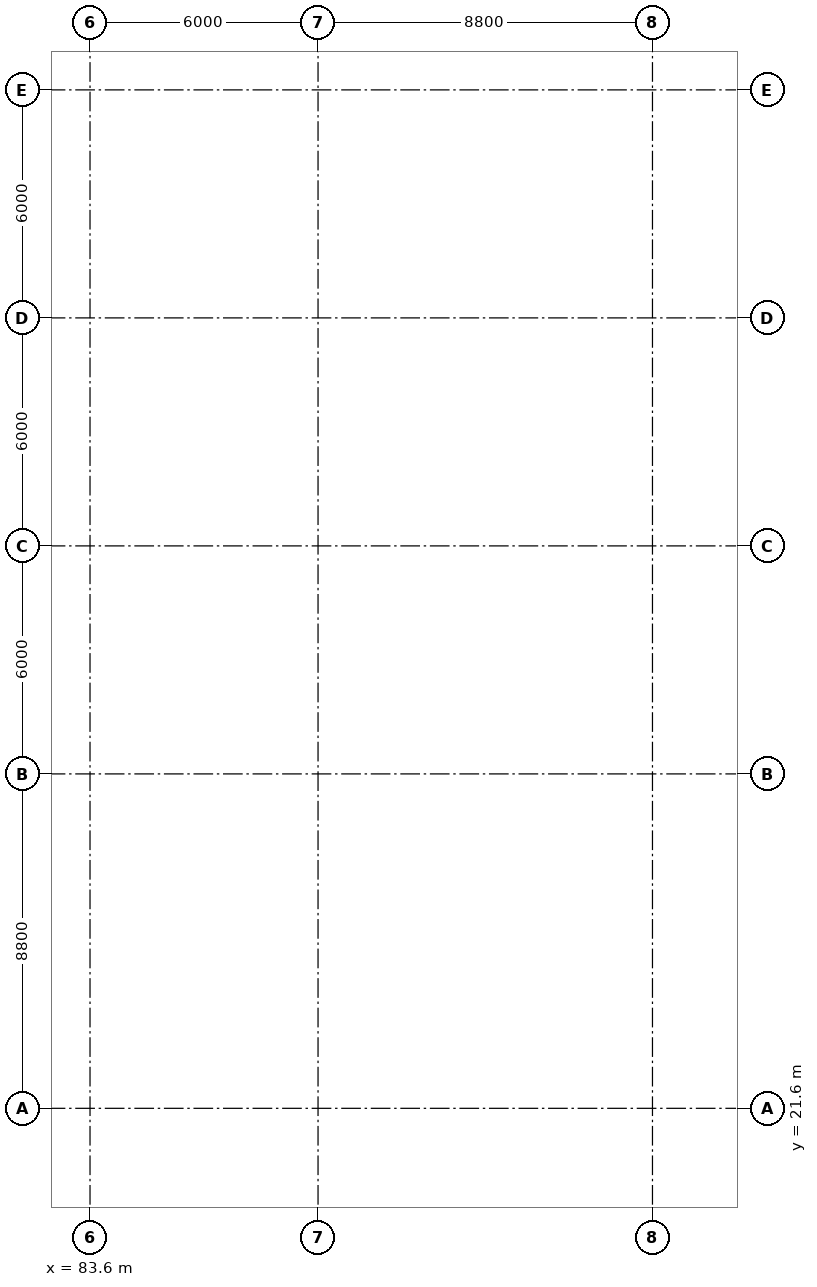
"""IFC4 building model, lengths in metres.
Left out: names, types, materials, properties, quantities, classifications, styles, units other than length and angle.
Written with IfcOpenShell. Run it as: python <this file> out.ifc"""

import sys

from ifc_helpers import new_model, si_unit, direction, frame, frame_2d, origin, origin_2d, place, context, subcontext, project, spatial, rectangle, extrude, element, fill, save


model = new_model("IFC4")
c1 = context("Model", 3, precision=1e-05, world=origin(), true_north=direction((0.0, 1.0)))
c2 = subcontext(c1, "Body", "Model", "MODEL_VIEW")
j1 = project(units=[si_unit("LENGTHUNIT", "METRE"), si_unit("PLANEANGLEUNIT", "RADIAN")], contexts=[c1])
p1 = place(None, origin())
s1 = spatial("IfcSite", under=j1, at=p1, CompositionType="ELEMENT")
p2 = place(p1, origin())
s2 = spatial("IfcBuilding", under=s1, at=p2, CompositionType="ELEMENT")
p3 = place(p2, frame((0.0, 0.0, 14.5)))
s3 = spatial("IfcBuildingStorey", under=s2, at=p3, CompositionType="ELEMENT", Elevation=14.5)
p4 = place(p3, frame((62.5, 33.95, 0.0), z_axis=(0.0, 0.0, 1.0), x_axis=(1.0, 0.0, 0.0)))
e1 = element("IfcWall", 1, at=p4, inside=s3, PredefinedType="SHEAR", context=c2, shape_type="SweptSolid", body=[
    extrude(rectangle(XDim=24.0, YDim=0.9, at=frame_2d((12.0, 0.0))), origin(), (0.0, 0.0, 1.0), 4.2),
])
p5 = place(p4, frame((2.05, 0.0, 0.0)))
e2 = element("IfcOpeningElement", 2, at=p5, cuts=e1, PredefinedType="OPENING", context=c2, shape_type="SweptSolid", body=[
    extrude(rectangle(XDim=1.1, YDim=2.1, at=frame_2d((0.55, 1.05))), frame((0.0, 0.46, 0.0), z_axis=(0.0, -1.0, 0.0), x_axis=(1.0, 0.0, 0.0)), (0.0, 0.0, 1.0), 0.92),
])
p6 = place(p4, frame((20.85, 0.0, 0.0)))
e3 = element("IfcOpeningElement", 3, at=p6, cuts=e1, PredefinedType="OPENING", context=c2, shape_type="SweptSolid", body=[
    extrude(rectangle(XDim=1.1, YDim=2.1, at=frame_2d((0.55, 1.05))), frame((0.0, 0.46, 0.0), z_axis=(0.0, -1.0, 0.0), x_axis=(1.0, 0.0, 0.0)), (0.0, 0.0, 1.0), 0.92),
])
p7 = place(p4, frame((8.0, 0.0, 0.0)))
e4 = element("IfcOpeningElement", 4, at=p7, cuts=e1, PredefinedType="OPENING", context=c2, shape_type="SweptSolid", body=[
    extrude(rectangle(XDim=1.1, YDim=2.1, at=frame_2d((0.55, 1.05))), frame((0.0, 0.46, 0.0), z_axis=(0.0, -1.0, 0.0), x_axis=(1.0, 0.0, 0.0)), (0.0, 0.0, 1.0), 0.92),
])
p8 = place(p4, frame((17.488, 0.0, 0.0)))
e5 = element("IfcOpeningElement", 5, at=p8, cuts=e1, PredefinedType="OPENING", context=c2, shape_type="SweptSolid", body=[
    extrude(rectangle(XDim=0.9, YDim=2.1, at=frame_2d((0.45, 1.05))), frame((0.0, 0.46, 0.0), z_axis=(0.0, -1.0, 0.0), x_axis=(1.0, 0.0, 0.0)), (0.0, 0.0, 1.0), 0.92),
])
p9 = place(p3, frame((86.05, 33.5, 0.0), z_axis=(0.0, 0.0, 1.0), x_axis=(0.0, 1.0, 0.0)))
e6 = element("IfcWall", 6, at=p9, inside=s3, PredefinedType="SHEAR", context=c2, shape_type="SweptSolid", body=[
    extrude(rectangle(XDim=24.0, YDim=0.9, at=frame_2d((12.0, 0.0))), origin(), (0.0, 0.0, 1.0), 4.2),
])
p10 = place(p9, frame((11.2, 0.0, 0.0)))
e7 = element("IfcOpeningElement", 7, at=p10, cuts=e6, PredefinedType="OPENING", context=c2, shape_type="SweptSolid", body=[
    extrude(rectangle(XDim=1.6, YDim=2.1, at=frame_2d((0.8, 1.05))), frame((0.0, 0.46, 0.0), z_axis=(0.0, -1.0, 0.0), x_axis=(1.0, 0.0, 0.0)), (0.0, 0.0, 1.0), 0.92),
])
p11 = place(p3, frame((62.95, 41.0, 0.0), z_axis=(0.0, 0.0, 1.0), x_axis=(1.0, 0.0, 0.0)))
e8 = element("IfcWall", 8, at=p11, inside=s3, PredefinedType="SHEAR", context=c2, shape_type="SweptSolid", body=[
    extrude(rectangle(XDim=23.1, YDim=0.4, at=frame_2d((11.55, 0.0))), origin(), (0.0, 0.0, 1.0), 4.2),
])
p12 = place(p3, frame((62.95, 43.9, 0.0), z_axis=(0.0, 0.0, 1.0), x_axis=(1.0, 0.0, 0.0)))
e9 = element("IfcWall", 9, at=p12, inside=s3, PredefinedType="SHEAR", context=c2, shape_type="SweptSolid", body=[
    extrude(rectangle(XDim=23.1, YDim=0.4, at=frame_2d((11.55, 0.0))), origin(), (0.0, 0.0, 1.0), 4.2),
])
p13 = place(p12, frame((1.7, 0.0, 0.0)))
e10 = element("IfcOpeningElement", 10, at=p13, cuts=e9, PredefinedType="OPENING", context=c2, shape_type="SweptSolid", body=[
    extrude(rectangle(XDim=0.9, YDim=2.1, at=frame_2d((0.45, 1.05))), frame((0.0, 0.21, 0.0), z_axis=(0.0, -1.0, 0.0), x_axis=(1.0, 0.0, 0.0)), (0.0, 0.0, 1.0), 0.42),
])
p14 = place(p12, frame((20.5, 0.0, 0.0)))
e11 = element("IfcOpeningElement", 11, at=p14, cuts=e9, PredefinedType="OPENING", context=c2, shape_type="SweptSolid", body=[
    extrude(rectangle(XDim=0.9, YDim=2.1, at=frame_2d((0.45, 1.05))), frame((0.0, 0.21, 0.0), z_axis=(0.0, -1.0, 0.0), x_axis=(1.0, 0.0, 0.0)), (0.0, 0.0, 1.0), 0.42),
])
p15 = place(p12, frame((4.75, 0.0, 0.0)))
e12 = element("IfcOpeningElement", 12, at=p15, cuts=e9, PredefinedType="OPENING", context=c2, shape_type="SweptSolid", body=[
    extrude(rectangle(XDim=1.1, YDim=2.1, at=frame_2d((0.55, 1.05))), frame((0.0, 0.21, 0.0), z_axis=(0.0, -1.0, 0.0), x_axis=(1.0, 0.0, 0.0)), (0.0, 0.0, 1.0), 0.42),
])
p16 = place(p12, frame((7.25, 0.0, 0.0)))
e13 = element("IfcOpeningElement", 13, at=p16, cuts=e9, PredefinedType="OPENING", context=c2, shape_type="SweptSolid", body=[
    extrude(rectangle(XDim=1.1, YDim=2.1, at=frame_2d((0.55, 1.05))), frame((0.0, 0.21, 0.0), z_axis=(0.0, -1.0, 0.0), x_axis=(1.0, 0.0, 0.0)), (0.0, 0.0, 1.0), 0.42),
])
p17 = place(p12, frame((9.75, 0.0, 0.0)))
e14 = element("IfcOpeningElement", 14, at=p17, cuts=e9, PredefinedType="OPENING", context=c2, shape_type="SweptSolid", body=[
    extrude(rectangle(XDim=1.1, YDim=2.1, at=frame_2d((0.55, 1.05))), frame((0.0, 0.21, 0.0), z_axis=(0.0, -1.0, 0.0), x_axis=(1.0, 0.0, 0.0)), (0.0, 0.0, 1.0), 0.42),
])
p18 = place(p12, frame((12.25, 0.0, 0.0)))
e15 = element("IfcOpeningElement", 15, at=p18, cuts=e9, PredefinedType="OPENING", context=c2, shape_type="SweptSolid", body=[
    extrude(rectangle(XDim=1.1, YDim=2.1, at=frame_2d((0.55, 1.05))), frame((0.0, 0.21, 0.0), z_axis=(0.0, -1.0, 0.0), x_axis=(1.0, 0.0, 0.0)), (0.0, 0.0, 1.0), 0.42),
])
p19 = place(p12, frame((14.75, 0.0, 0.0)))
e16 = element("IfcOpeningElement", 16, at=p19, cuts=e9, PredefinedType="OPENING", context=c2, shape_type="SweptSolid", body=[
    extrude(rectangle(XDim=1.1, YDim=2.1, at=frame_2d((0.55, 1.05))), frame((0.0, 0.21, 0.0), z_axis=(0.0, -1.0, 0.0), x_axis=(1.0, 0.0, 0.0)), (0.0, 0.0, 1.0), 0.42),
])
p20 = place(p12, frame((17.25, 0.0, 0.0)))
e17 = element("IfcOpeningElement", 17, at=p20, cuts=e9, PredefinedType="OPENING", context=c2, shape_type="SweptSolid", body=[
    extrude(rectangle(XDim=1.1, YDim=2.1, at=frame_2d((0.55, 1.05))), frame((0.0, 0.21, 0.0), z_axis=(0.0, -1.0, 0.0), x_axis=(1.0, 0.0, 0.0)), (0.0, 0.0, 1.0), 0.42),
])
p21 = place(p3, frame((62.95, 47.1, 0.0), z_axis=(0.0, 0.0, 1.0), x_axis=(1.0, 0.0, 0.0)))
e18 = element("IfcWall", 18, at=p21, inside=s3, PredefinedType="SHEAR", context=c2, shape_type="SweptSolid", body=[
    extrude(rectangle(XDim=23.1, YDim=0.4, at=frame_2d((11.55, 0.0))), origin(), (0.0, 0.0, 1.0), 4.2),
])
p22 = place(p21, frame((1.088, 0.0, 0.0)))
e19 = element("IfcOpeningElement", 19, at=p22, cuts=e18, PredefinedType="OPENING", context=c2, shape_type="SweptSolid", body=[
    extrude(rectangle(XDim=0.9, YDim=2.1, at=frame_2d((0.45, 1.05))), frame((0.0, 0.21, 0.0), z_axis=(0.0, -1.0, 0.0), x_axis=(1.0, 0.0, 0.0)), (0.0, 0.0, 1.0), 0.42),
])
p23 = place(p21, frame((2.838, 0.0, 0.0)))
e20 = element("IfcOpeningElement", 20, at=p23, cuts=e18, PredefinedType="OPENING", context=c2, shape_type="SweptSolid", body=[
    extrude(rectangle(XDim=0.8, YDim=2.1, at=frame_2d((0.4, 1.05))), frame((0.0, 0.21, 0.0), z_axis=(0.0, -1.0, 0.0), x_axis=(1.0, 0.0, 0.0)), (0.0, 0.0, 1.0), 0.42),
])
p24 = place(p21, frame((20.5, 0.0, 0.0)))
e21 = element("IfcOpeningElement", 21, at=p24, cuts=e18, PredefinedType="OPENING", context=c2, shape_type="SweptSolid", body=[
    extrude(rectangle(XDim=0.9, YDim=2.1, at=frame_2d((0.45, 1.05))), frame((0.0, 0.21, 0.0), z_axis=(0.0, -1.0, 0.0), x_axis=(1.0, 0.0, 0.0)), (0.0, 0.0, 1.0), 0.42),
])
for number, where, z_axis, x_axis in (
    (22, (83.6, 20.6, 0.0), (0.0, 0.0, 1.0), (1.0, 0.0, 0.0)),
    (23, (89.6, 20.6, 0.0), (0.0, 0.0, 1.0), (1.0, 0.0, 0.0)),
    (24, (99.4, 30.4, 0.0), (0.0, 0.0, 1.0), (1.0, 0.0, 0.0)),
    (25, (99.4, 36.4, 0.0), (0.0, 0.0, 1.0), (1.0, 0.0, 0.0)),
    (26, (99.4, 42.4, 0.0), (0.0, 0.0, 1.0), (1.0, 0.0, 0.0)),
    (27, (99.4, 48.4, 0.0), (0.0, 0.0, 1.0), (1.0, 0.0, 0.0)),
):
    element("IfcColumn", number, at=place(p3, frame(where, z_axis=z_axis, x_axis=x_axis)), inside=s3, PredefinedType="COLUMN", context=c2, shape_type="SweptSolid", body=[
        extrude(rectangle(XDim=1.2, YDim=1.2, at=origin_2d()), origin(), (0.0, 0.0, 1.0), 4.2),
    ])
p25 = place(p3, frame((96.8, 23.2, 0.0), z_axis=(0.0, 0.0, 1.0), x_axis=(1.0, 0.0, 0.0)))
e28 = element("IfcColumn", 28, at=p25, inside=s3, PredefinedType="COLUMN", context=c2, shape_type="SweptSolid", body=[
    extrude(rectangle(XDim=3.2, YDim=3.2, at=origin_2d()), origin(), (0.0, 0.0, 1.0), 4.2),
])
p26 = place(p3, frame((77.705, 30.4, 0.0), z_axis=(0.0, 0.0, 1.0), x_axis=(1.0, 0.0, 0.0)))
e29 = element("IfcWall", 29, at=p26, inside=s3, PredefinedType="PARTITIONING", context=c2, shape_type="SweptSolid", body=[
    extrude(rectangle(XDim=5.789, YDim=0.15, at=frame_2d((2.895, 0.0))), origin(), (0.0, 0.0, 1.0), 4.2),
])
p27 = place(p26, frame((2.395, 0.0, 0.0)))
e30 = element("IfcOpeningElement", 30, at=p27, cuts=e29, PredefinedType="OPENING", context=c2, shape_type="SweptSolid", body=[
    extrude(rectangle(XDim=1.0, YDim=2.1, at=frame_2d((0.5, 1.05))), frame((0.0, 0.085, 0.0), z_axis=(0.0, -1.0, 0.0), x_axis=(1.0, 0.0, 0.0)), (0.0, 0.0, 1.0), 0.17),
])
p28 = place(p3, frame((83.495, 30.4, 0.0), z_axis=(0.0, 0.0, 1.0), x_axis=(1.0, 0.0, 0.0)))
e31 = element("IfcWall", 31, at=p28, inside=s3, PredefinedType="PARTITIONING", context=c2, shape_type="SweptSolid", body=[
    extrude(rectangle(XDim=0.211, YDim=0.15, at=frame_2d((0.105, 0.0))), origin(), (0.0, 0.0, 1.0), 3.661),
])
p29 = place(p3, frame((83.705, 30.4, 0.0), z_axis=(0.0, 0.0, 1.0), x_axis=(1.0, 0.0, 0.0)))
e32 = element("IfcWall", 32, at=p29, inside=s3, PredefinedType="PARTITIONING", context=c2, shape_type="SweptSolid", body=[
    extrude(rectangle(XDim=5.789, YDim=0.15, at=frame_2d((2.895, 0.0))), origin(), (0.0, 0.0, 1.0), 4.2),
])
p30 = place(p29, frame((2.395, 0.0, 0.0)))
e33 = element("IfcOpeningElement", 33, at=p30, cuts=e32, PredefinedType="OPENING", context=c2, shape_type="SweptSolid", body=[
    extrude(rectangle(XDim=1.0, YDim=2.1, at=frame_2d((0.5, 1.05))), frame((0.0, 0.085, 0.0), z_axis=(0.0, -1.0, 0.0), x_axis=(1.0, 0.0, 0.0)), (0.0, 0.0, 1.0), 0.17),
])
p31 = place(p3, frame((89.495, 30.4, 0.0), z_axis=(0.0, 0.0, 1.0), x_axis=(1.0, 0.0, 0.0)))
e34 = element("IfcWall", 34, at=p31, inside=s3, PredefinedType="PARTITIONING", context=c2, shape_type="SweptSolid", body=[
    extrude(rectangle(XDim=0.211, YDim=0.15, at=frame_2d((0.105, 0.0))), origin(), (0.0, 0.0, 1.0), 3.661),
])
p32 = place(p3, frame((89.72, 30.4, 0.0), z_axis=(0.0, 0.0, 1.0), x_axis=(1.0, 0.0, 0.0)))
e35 = element("IfcWall", 35, at=p32, inside=s3, PredefinedType="PARTITIONING", context=c2, shape_type="SweptSolid", body=[
    extrude(rectangle(XDim=9.08, YDim=0.15, at=frame_2d((4.54, 0.0))), origin(), (0.0, 0.0, 1.0), 3.667),
])
for number, where, z_axis, x_axis in (
    (36, (89.675, 48.4, 0.0), (0.0, 0.0, 1.0), (1.0, 0.0, 0.0)),
    (37, (83.6, 21.2, 0.0), (0.0, 0.0, 1.0), (0.0, 1.0, 0.0)),
):
    element("IfcWall", number, at=place(p3, frame(where, z_axis=z_axis, x_axis=x_axis)), inside=s3, PredefinedType="PARTITIONING", context=c2, shape_type="SweptSolid", body=[
        extrude(rectangle(XDim=9.125, YDim=0.1, at=frame_2d((4.562, 0.0))), origin(), (0.0, 0.0, 1.0), 3.661),
    ])
p33 = place(p3, frame((89.6, 30.475, 0.0), z_axis=(0.0, 0.0, 1.0), x_axis=(0.0, 1.0, 0.0)))
e38 = element("IfcWall", 38, at=p33, inside=s3, PredefinedType="PARTITIONING", context=c2, shape_type="SweptSolid", body=[
    extrude(rectangle(XDim=5.82, YDim=0.15, at=frame_2d((2.91, 0.0))), origin(), (0.0, 0.0, 1.0), 3.661),
])
p34 = place(p3, frame((89.6, 36.3, 0.0), z_axis=(0.0, 0.0, 1.0), x_axis=(0.0, 1.0, 0.0)))
e39 = element("IfcWall", 39, at=p34, inside=s3, PredefinedType="PARTITIONING", context=c2, shape_type="SweptSolid", body=[
    extrude(rectangle(XDim=0.206, YDim=0.15, at=frame_2d((0.103, 0.0))), origin(), (0.0, 0.0, 1.0), 3.661),
])
p35 = place(p3, frame((89.6, 36.505, 0.0), z_axis=(0.0, 0.0, 1.0), x_axis=(0.0, 1.0, 0.0)))
e40 = element("IfcWall", 40, at=p35, inside=s3, PredefinedType="PARTITIONING", context=c2, shape_type="SweptSolid", body=[
    extrude(rectangle(XDim=5.789, YDim=0.15, at=frame_2d((2.895, 0.0))), origin(), (0.0, 0.0, 1.0), 4.2),
])
p36 = place(p35, frame((1.995, 0.0, 0.0)))
e41 = element("IfcOpeningElement", 41, at=p36, cuts=e40, PredefinedType="OPENING", context=c2, shape_type="SweptSolid", body=[
    extrude(rectangle(XDim=1.8, YDim=2.1, at=frame_2d((0.9, 1.05))), frame((0.0, 0.085, 0.0), z_axis=(0.0, -1.0, 0.0), x_axis=(1.0, 0.0, 0.0)), (0.0, 0.0, 1.0), 0.17),
])
p37 = place(p3, frame((89.6, 42.295, 0.0), z_axis=(0.0, 0.0, 1.0), x_axis=(0.0, 1.0, 0.0)))
e42 = element("IfcWall", 42, at=p37, inside=s3, PredefinedType="PARTITIONING", context=c2, shape_type="SweptSolid", body=[
    extrude(rectangle(XDim=0.211, YDim=0.15, at=frame_2d((0.105, 0.0))), origin(), (0.0, 0.0, 1.0), 3.661),
])
p38 = place(p3, frame((89.6, 42.505, 0.0), z_axis=(0.0, 0.0, 1.0), x_axis=(0.0, 1.0, 0.0)))
e43 = element("IfcWall", 43, at=p38, inside=s3, PredefinedType="PARTITIONING", context=c2, shape_type="SweptSolid", body=[
    extrude(rectangle(XDim=5.789, YDim=0.15, at=frame_2d((2.895, 0.0))), origin(), (0.0, 0.0, 1.0), 4.2),
])
p39 = place(p3, frame((89.6, 48.295, 0.0), z_axis=(0.0, 0.0, 1.0), x_axis=(0.0, 1.0, 0.0)))
e44 = element("IfcWall", 44, at=p39, inside=s3, PredefinedType="PARTITIONING", context=c2, shape_type="SweptSolid", body=[
    extrude(rectangle(XDim=0.211, YDim=0.15, at=frame_2d((0.105, 0.0))), origin(), (0.0, 0.0, 1.0), 3.661),
])
p40 = place(p3, frame((89.6, 48.505, 0.0), z_axis=(0.0, 0.0, 1.0), x_axis=(0.0, 1.0, 0.0)))
e45 = element("IfcWall", 45, at=p40, inside=s3, PredefinedType="PARTITIONING", context=c2, shape_type="SweptSolid", body=[
    extrude(rectangle(XDim=5.789, YDim=0.15, at=frame_2d((2.895, 0.0))), origin(), (0.0, 0.0, 1.0), 4.2),
])
p41 = place(p40, frame((2.395, 0.0, 0.0)))
e46 = element("IfcOpeningElement", 46, at=p41, cuts=e45, PredefinedType="OPENING", context=c2, shape_type="SweptSolid", body=[
    extrude(rectangle(XDim=1.0, YDim=2.1, at=frame_2d((0.5, 1.05))), frame((0.0, 0.085, 0.0), z_axis=(0.0, -1.0, 0.0), x_axis=(1.0, 0.0, 0.0)), (0.0, 0.0, 1.0), 0.17),
])
p42 = place(p6, origin())
e47 = element("IfcDoor", 47, at=p42, inside=s3, OperationType="SINGLE_SWING_RIGHT", PredefinedType="DOOR", context=c2, shape_type="SweptSolid", body=[
    extrude(rectangle(XDim=1.1, YDim=2.1, at=frame_2d((0.55, 1.05))), frame((0.0, 0.438, 0.0), z_axis=(0.0, -1.0, 0.0), x_axis=(1.0, 0.0, 0.0)), (0.0, 0.0, 1.0), 0.05),
])
fill(e3, e47)
p43 = place(p10, origin())
e48 = element("IfcDoor", 48, at=p43, inside=s3, OperationType="DOUBLE_DOOR_SINGLE_SWING", PredefinedType="DOOR", context=c2, shape_type="SweptSolid", body=[
    extrude(rectangle(XDim=1.6, YDim=2.1, at=frame_2d((0.8, 1.05))), frame((0.0, 0.438, 0.0), z_axis=(0.0, -1.0, 0.0), x_axis=(1.0, 0.0, 0.0)), (0.0, 0.0, 1.0), 0.05),
])
fill(e7, e48)
p44 = place(p14, origin())
e49 = element("IfcDoor", 49, at=p44, inside=s3, OperationType="SINGLE_SWING_LEFT", PredefinedType="DOOR", context=c2, shape_type="SweptSolid", body=[
    extrude(rectangle(XDim=0.9, YDim=2.1, at=frame_2d((0.45, 1.05))), frame((0.0, -0.138, 0.0), z_axis=(0.0, -1.0, 0.0), x_axis=(1.0, 0.0, 0.0)), (0.0, 0.0, 1.0), 0.05),
])
fill(e11, e49)
p45 = place(p24, origin())
e50 = element("IfcDoor", 50, at=p45, inside=s3, OperationType="SINGLE_SWING_LEFT", PredefinedType="DOOR", context=c2, shape_type="SweptSolid", body=[
    extrude(rectangle(XDim=0.9, YDim=2.1, at=frame_2d((0.45, 1.05))), frame((0.0, 0.188, 0.0), z_axis=(0.0, -1.0, 0.0), x_axis=(1.0, 0.0, 0.0)), (0.0, 0.0, 1.0), 0.05),
])
fill(e21, e50)
p46 = place(p30, origin())
e51 = element("IfcDoor", 51, at=p46, inside=s3, OperationType="SINGLE_SWING_LEFT", PredefinedType="DOOR", context=c2, shape_type="SweptSolid", body=[
    extrude(rectangle(XDim=1.0, YDim=2.1, at=frame_2d((0.5, 1.05))), frame((0.0, 0.025, 0.0), z_axis=(0.0, -1.0, 0.0), x_axis=(1.0, 0.0, 0.0)), (0.0, 0.0, 1.0), 0.05),
])
fill(e33, e51)
p47 = place(p36, origin())
e52 = element("IfcDoor", 52, at=p47, inside=s3, OperationType="DOUBLE_DOOR_SINGLE_SWING", PredefinedType="DOOR", context=c2, shape_type="SweptSolid", body=[
    extrude(rectangle(XDim=1.8, YDim=2.1, at=frame_2d((0.9, 1.05))), frame((0.0, 0.025, 0.0), z_axis=(0.0, -1.0, 0.0), x_axis=(1.0, 0.0, 0.0)), (0.0, 0.0, 1.0), 0.05),
])
fill(e41, e52)
save(model, sys.argv[1])
